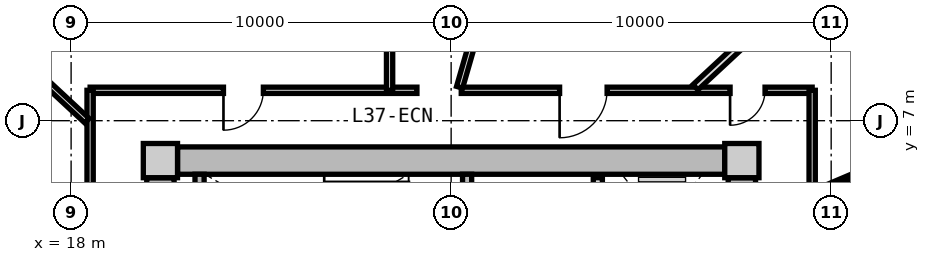
"""IFC4 building model, lengths in metres.
Left out: names, types, materials, properties, quantities, classifications, styles, units other than length and angle.
Written with IfcOpenShell. Run it as: python <this file> out.ifc"""

import sys

from ifc_helpers import new_model, si_unit, direction, frame, frame_2d, origin, origin_2d, place, context, subcontext, project, spatial, rectangle, extrude, source, transform, mapped, element, fill, save


model = new_model("IFC4")
c1 = context("Model", 3, precision=1e-05, world=origin(), true_north=direction((0.0, 1.0)))
c2 = subcontext(c1, "Body", "Model", "MODEL_VIEW")
j1 = project(units=[si_unit("LENGTHUNIT", "METRE"), si_unit("PLANEANGLEUNIT", "RADIAN")], contexts=[c1])
p1 = place(None, origin())
s1 = spatial("IfcSite", under=j1, at=p1, CompositionType="ELEMENT")
p2 = place(p1, origin())
s2 = spatial("IfcBuilding", under=s1, at=p2, CompositionType="ELEMENT")
p3 = place(p2, frame((0.0, 0.0, 120.65)))
s3 = spatial("IfcBuildingStorey", under=s2, at=p3, CompositionType="ELEMENT", Elevation=120.65)
m1 = source(origin(), c2, "Body", "SweptSolid", [
    extrude(rectangle(XDim=0.9, YDim=0.9, at=origin_2d()), origin(), (0.0, 0.0, 1.0), 3.05),
])
for number, where, z_axis, x_axis in (
    (1, (35.65, 5.95, 0.0), (0.0, 0.0, 1.0), (1.0, 0.0, 0.0)),
    (2, (20.35, 5.95, 0.0), (0.0, 0.0, 1.0), (1.0, 0.0, 0.0)),
):
    element("IfcColumn", number, at=place(p3, frame(where, z_axis=z_axis, x_axis=x_axis)), inside=s3, PredefinedType="COLUMN", context=c2, shape_type="MappedRepresentation", body=[
        mapped(m1, transform((0.0, 0.0, 0.0), x_axis=(1.0, 0.0, 0.0), y_axis=(0.0, 1.0, 0.0), z_axis=(0.0, 0.0, 1.0), scale=1.0)),
    ])
m2 = source(origin(), c2, "Body", "SweptSolid", [
    extrude(rectangle(XDim=14.4, YDim=0.72, at=frame_2d((7.2, 0.0))), origin(), (0.0, 0.0, 1.0), 2.79),
])
p4 = place(p3, frame((20.8, 5.95, 0.0), z_axis=(0.0, 0.0, 1.0), x_axis=(1.0, 0.0, 0.0)))
e3 = element("IfcWall", 3, at=p4, inside=s3, PredefinedType="SHEAR", context=c2, shape_type="MappedRepresentation", body=[
    mapped(m2, transform((0.0, 0.0, 0.0), x_axis=(1.0, 0.0, 0.0), y_axis=(0.0, 1.0, 0.0), z_axis=(0.0, 0.0, 1.0), scale=1.0)),
])
m3 = source(origin(), c2, "Body", "SweptSolid", [
    extrude(rectangle(XDim=11.0, YDim=0.72, at=frame_2d((5.5, 0.0))), origin(), (0.0, 0.0, 1.0), 2.79),
])
p5 = place(p3, frame((20.35, -5.5, 0.0), z_axis=(0.0, 0.0, 1.0), x_axis=(0.0, 1.0, 0.0)))
e4 = element("IfcWall", 4, at=p5, inside=s3, PredefinedType="SHEAR", context=c2, shape_type="MappedRepresentation", body=[
    mapped(m3, transform((0.0, 0.0, 0.0), x_axis=(1.0, 0.0, 0.0), y_axis=(0.0, 1.0, 0.0), z_axis=(0.0, 0.0, 1.0), scale=1.0)),
])
p6 = place(p5, frame((3.8, 0.0, 0.0)))
e5 = element("IfcOpeningElement", 5, at=p6, cuts=e4, PredefinedType="OPENING", context=c2, shape_type="SweptSolid", body=[
    extrude(rectangle(XDim=1.2, YDim=2.15, at=frame_2d((0.6, 1.075))), frame((0.0, 0.37, 0.0), z_axis=(0.0, -1.0, 0.0), x_axis=(1.0, 0.0, 0.0)), (0.0, 0.0, 1.0), 0.74),
])
p7 = place(p3, frame((35.65, 5.5, 0.0), z_axis=(0.0, 0.0, 1.0), x_axis=(0.0, -1.0, 0.0)))
e6 = element("IfcWall", 6, at=p7, inside=s3, PredefinedType="SHEAR", context=c2, shape_type="MappedRepresentation", body=[
    mapped(m3, transform((0.0, 0.0, 0.0), x_axis=(1.0, 0.0, 0.0), y_axis=(0.0, 1.0, 0.0), z_axis=(0.0, 0.0, 1.0), scale=1.0)),
])
p8 = place(p7, frame((5.65, 0.0, 0.0)))
e7 = element("IfcOpeningElement", 7, at=p8, cuts=e6, PredefinedType="OPENING", context=c2, shape_type="SweptSolid", body=[
    extrude(rectangle(XDim=1.2, YDim=2.15, at=frame_2d((0.6, 1.075))), frame((0.0, 0.37, 0.0), z_axis=(0.0, -1.0, 0.0), x_axis=(1.0, 0.0, 0.0)), (0.0, 0.0, 1.0), 0.74),
])
m4 = source(origin(), c2, "Body", "SweptSolid", [
    extrude(rectangle(XDim=3.14, YDim=0.24, at=frame_2d((1.57, 0.0))), origin(), (0.0, 0.0, 1.0), 2.79),
])
p9 = place(p3, frame((21.38, 2.45, 0.0), z_axis=(0.0, 0.0, 1.0), x_axis=(0.0, 1.0, 0.0)))
e8 = element("IfcWall", 8, at=p9, inside=s3, PredefinedType="PARTITIONING", context=c2, shape_type="MappedRepresentation", body=[
    mapped(m4, transform((0.0, 0.0, 0.0), x_axis=(1.0, 0.0, 0.0), y_axis=(0.0, 1.0, 0.0), z_axis=(0.0, 0.0, 1.0), scale=1.0)),
])
p10 = place(p3, frame((28.42, 2.45, 0.0), z_axis=(0.0, 0.0, 1.0), x_axis=(0.0, 1.0, 0.0)))
e9 = element("IfcWall", 9, at=p10, inside=s3, PredefinedType="PARTITIONING", context=c2, shape_type="MappedRepresentation", body=[
    mapped(m4, transform((0.0, 0.0, 0.0), x_axis=(1.0, 0.0, 0.0), y_axis=(0.0, 1.0, 0.0), z_axis=(0.0, 0.0, 1.0), scale=1.0)),
])
p11 = place(p10, frame((0.55, 0.0, 0.0)))
e10 = element("IfcOpeningElement", 10, at=p11, cuts=e9, PredefinedType="OPENING", context=c2, shape_type="SweptSolid", body=[
    extrude(rectangle(XDim=1.1, YDim=2.15, at=frame_2d((0.55, 1.075))), frame((0.0, 0.13, 0.0), z_axis=(0.0, -1.0, 0.0), x_axis=(1.0, 0.0, 0.0)), (0.0, 0.0, 1.0), 0.26),
])
m5 = source(origin(), c2, "Body", "SweptSolid", [
    extrude(rectangle(XDim=5.0, YDim=0.24, at=frame_2d((2.5, 0.0))), origin(), (0.0, 0.0, 1.0), 2.775),
])
p12 = place(p3, frame((31.86, 0.5, 0.0), z_axis=(0.0, 0.0, 1.0), x_axis=(0.0, 1.0, 0.0)))
e11 = element("IfcWall", 11, at=p12, inside=s3, PredefinedType="PARTITIONING", context=c2, shape_type="MappedRepresentation", body=[
    mapped(m5, transform((0.0, 0.0, 0.0), x_axis=(1.0, 0.0, 0.0), y_axis=(0.0, 1.0, 0.0), z_axis=(0.0, 0.0, 1.0), scale=1.0)),
])
p13 = place(p12, frame((3.05, 0.0, 0.0)))
e12 = element("IfcOpeningElement", 12, at=p13, cuts=e11, PredefinedType="OPENING", context=c2, shape_type="SweptSolid", body=[
    extrude(rectangle(XDim=1.3, YDim=2.2, at=frame_2d((0.65, 1.1))), frame((0.0, 0.13, 0.0), z_axis=(0.0, -1.0, 0.0), x_axis=(1.0, 0.0, 0.0)), (0.0, 0.0, 1.0), 0.26),
])
p14 = place(p12, frame((0.55, 0.0, 0.0)))
e13 = element("IfcOpeningElement", 13, at=p14, cuts=e11, PredefinedType="OPENING", context=c2, shape_type="SweptSolid", body=[
    extrude(rectangle(XDim=1.3, YDim=2.2, at=frame_2d((0.65, 1.1))), frame((0.0, 0.13, 0.0), z_axis=(0.0, -1.0, 0.0), x_axis=(1.0, 0.0, 0.0)), (0.0, 0.0, 1.0), 0.26),
])
m6 = source(origin(), c2, "Body", "SweptSolid", [
    extrude(rectangle(XDim=8.6, YDim=0.165, at=frame_2d((4.3, 0.0))), origin(), (0.0, 0.0, 1.0), 2.775),
])
p15 = place(p3, frame((18.5, 7.8, 0.0), z_axis=(0.0, 0.0, 1.0), x_axis=(1.0, 0.0, 0.0)))
e14 = element("IfcWall", 14, at=p15, inside=s3, PredefinedType="PARTITIONING", context=c2, shape_type="MappedRepresentation", body=[
    mapped(m6, transform((0.0, 0.0, 0.0), x_axis=(1.0, 0.0, 0.0), y_axis=(0.0, 1.0, 0.0), z_axis=(0.0, 0.0, 1.0), scale=1.0)),
])
p16 = place(p15, frame((3.509, 0.0, 0.0)))
e15 = element("IfcOpeningElement", 15, at=p16, cuts=e14, PredefinedType="OPENING", context=c2, shape_type="SweptSolid", body=[
    extrude(rectangle(XDim=1.05, YDim=2.15, at=frame_2d((0.525, 1.075))), frame((0.0, 0.093, 0.0), z_axis=(0.0, -1.0, 0.0), x_axis=(1.0, 0.0, 0.0)), (0.0, 0.0, 1.0), 0.185),
])
m7 = source(origin(), c2, "Body", "SweptSolid", [
    extrude(rectangle(XDim=9.234, YDim=0.165, at=frame_2d((4.617, 0.0))), origin(), (0.0, 0.0, 1.0), 2.775),
])
p17 = place(p3, frame((28.266, 7.8, 0.0), z_axis=(0.0, 0.0, 1.0), x_axis=(1.0, 0.0, 0.0)))
e16 = element("IfcWall", 16, at=p17, inside=s3, PredefinedType="PARTITIONING", context=c2, shape_type="MappedRepresentation", body=[
    mapped(m7, transform((0.0, 0.0, 0.0), x_axis=(1.0, 0.0, 0.0), y_axis=(0.0, 1.0, 0.0), z_axis=(0.0, 0.0, 1.0), scale=1.0)),
])
p18 = place(p17, frame((7.074, 0.0, 0.0)))
e17 = element("IfcOpeningElement", 17, at=p18, cuts=e16, PredefinedType="OPENING", context=c2, shape_type="SweptSolid", body=[
    extrude(rectangle(XDim=0.92, YDim=2.1, at=frame_2d((0.46, 1.05))), frame((0.0, 0.093, 0.0), z_axis=(0.0, -1.0, 0.0), x_axis=(1.0, 0.0, 0.0)), (0.0, 0.0, 1.0), 0.185),
])
p19 = place(p17, frame((2.588, 0.0, 0.0)))
e18 = element("IfcOpeningElement", 18, at=p19, cuts=e16, PredefinedType="OPENING", context=c2, shape_type="SweptSolid", body=[
    extrude(rectangle(XDim=1.25, YDim=2.2, at=frame_2d((0.625, 1.1))), frame((0.0, 0.093, 0.0), z_axis=(0.0, -1.0, 0.0), x_axis=(1.0, 0.0, 0.0)), (0.0, 0.0, 1.0), 0.185),
])
m8 = source(origin(), c2, "Body", "SweptSolid", [
    extrude(rectangle(XDim=15.6, YDim=0.165, at=frame_2d((7.8, 0.0))), origin(), (0.0, 0.0, 1.0), 2.775),
])
p20 = place(p3, frame((18.5, -7.8, 0.0), z_axis=(0.0, 0.0, 1.0), x_axis=(0.0, 1.0, 0.0)))
e19 = element("IfcWall", 19, at=p20, inside=s3, PredefinedType="PARTITIONING", context=c2, shape_type="MappedRepresentation", body=[
    mapped(m8, transform((0.0, 0.0, 0.0), x_axis=(1.0, 0.0, 0.0), y_axis=(0.0, 1.0, 0.0), z_axis=(0.0, 0.0, 1.0), scale=1.0)),
])
p21 = place(p20, frame((10.383, 0.0, 0.0)))
e20 = element("IfcOpeningElement", 20, at=p21, cuts=e19, PredefinedType="OPENING", context=c2, shape_type="SweptSolid", body=[
    extrude(rectangle(XDim=1.05, YDim=2.15, at=frame_2d((0.525, 1.075))), frame((0.0, 0.093, 0.0), z_axis=(0.0, -1.0, 0.0), x_axis=(1.0, 0.0, 0.0)), (0.0, 0.0, 1.0), 0.185),
])
p22 = place(p20, frame((6.419, 0.0, 0.0)))
e21 = element("IfcOpeningElement", 21, at=p22, cuts=e19, PredefinedType="OPENING", context=c2, shape_type="SweptSolid", body=[
    extrude(rectangle(XDim=1.05, YDim=2.15, at=frame_2d((0.525, 1.075))), frame((0.0, 0.093, 0.0), z_axis=(0.0, -1.0, 0.0), x_axis=(1.0, 0.0, 0.0)), (0.0, 0.0, 1.0), 0.185),
])
p23 = place(p3, frame((37.5, 7.8, 0.0), z_axis=(0.0, 0.0, 1.0), x_axis=(0.0, -1.0, 0.0)))
e22 = element("IfcWall", 22, at=p23, inside=s3, PredefinedType="PARTITIONING", context=c2, shape_type="MappedRepresentation", body=[
    mapped(m8, transform((0.0, 0.0, 0.0), x_axis=(1.0, 0.0, 0.0), y_axis=(0.0, 1.0, 0.0), z_axis=(0.0, 0.0, 1.0), scale=1.0)),
])
p24 = place(p23, frame((12.094, 0.0, 0.0)))
e23 = element("IfcOpeningElement", 23, at=p24, cuts=e22, PredefinedType="OPENING", context=c2, shape_type="SweptSolid", body=[
    extrude(rectangle(XDim=1.05, YDim=2.15, at=frame_2d((0.525, 1.075))), frame((0.0, 0.093, 0.0), z_axis=(0.0, -1.0, 0.0), x_axis=(1.0, 0.0, 0.0)), (0.0, 0.0, 1.0), 0.185),
])
p25 = place(p23, frame((5.971, 0.0, 0.0)))
e24 = element("IfcOpeningElement", 24, at=p25, cuts=e22, PredefinedType="OPENING", context=c2, shape_type="SweptSolid", body=[
    extrude(rectangle(XDim=1.05, YDim=2.15, at=frame_2d((0.525, 1.075))), frame((0.0, 0.093, 0.0), z_axis=(0.0, -1.0, 0.0), x_axis=(1.0, 0.0, 0.0)), (0.0, 0.0, 1.0), 0.185),
])
p26 = place(p23, frame((3.324, 0.0, 0.0)))
e25 = element("IfcOpeningElement", 25, at=p26, cuts=e22, PredefinedType="OPENING", context=c2, shape_type="SweptSolid", body=[
    extrude(rectangle(XDim=0.92, YDim=2.1, at=frame_2d((0.46, 1.05))), frame((0.0, 0.093, 0.0), z_axis=(0.0, -1.0, 0.0), x_axis=(1.0, 0.0, 0.0)), (0.0, 0.0, 1.0), 0.185),
])
m9 = source(origin(), c2, "Body", "SweptSolid", [
    extrude(rectangle(XDim=8.989, YDim=0.165, at=frame_2d((4.495, 0.0))), origin(), (0.0, 0.0, 1.0), 2.275),
])
p27 = place(p3, frame((28.222, 7.88, 0.0), z_axis=(0.0, 0.0, 1.0), x_axis=(0.27702323008, 0.960863221274, 0.0)))
e26 = element("IfcWall", 26, at=p27, inside=s3, PredefinedType="PARTITIONING", context=c2, shape_type="MappedRepresentation", body=[
    mapped(m9, transform((0.0, 0.0, 0.0), x_axis=(1.0, 0.0, 0.0), y_axis=(0.0, 1.0, 0.0), z_axis=(0.0, 0.0, 1.0), scale=1.0)),
])
m10 = source(origin(), c2, "Body", "SweptSolid", [
    extrude(rectangle(XDim=7.482, YDim=0.165, at=frame_2d((3.741, 0.0))), origin(), (0.0, 0.0, 1.0), 2.275),
])
p28 = place(p3, frame((18.42, 6.998, 0.0), z_axis=(0.0, 0.0, 1.0), x_axis=(-0.732508698043, 0.680757671489, 0.0)))
e27 = element("IfcWall", 27, at=p28, inside=s3, PredefinedType="PARTITIONING", context=c2, shape_type="MappedRepresentation", body=[
    mapped(m10, transform((0.0, 0.0, 0.0), x_axis=(1.0, 0.0, 0.0), y_axis=(0.0, 1.0, 0.0), z_axis=(0.0, 0.0, 1.0), scale=1.0)),
])
m11 = source(origin(), c2, "Body", "SweptSolid", [
    extrude(rectangle(XDim=6.99, YDim=0.165, at=frame_2d((3.495, 0.0))), origin(), (0.0, 0.0, 1.0), 2.775),
])
p29 = place(p3, frame((26.38, 7.8, 0.0), z_axis=(0.0, 0.0, 1.0), x_axis=(0.0, 1.0, 0.0)))
e28 = element("IfcWall", 28, at=p29, inside=s3, PredefinedType="PARTITIONING", context=c2, shape_type="MappedRepresentation", body=[
    mapped(m11, transform((0.0, 0.0, 0.0), x_axis=(1.0, 0.0, 0.0), y_axis=(0.0, 1.0, 0.0), z_axis=(0.0, 0.0, 1.0), scale=1.0)),
])
m12 = source(origin(), c2, "Body", "SweptSolid", [
    extrude(rectangle(XDim=4.735, YDim=0.14, at=frame_2d((2.368, 0.0))), origin(), (0.0, 0.0, 1.0), 2.775),
])
p30 = place(p3, frame((18.47, 4.368, 0.0), z_axis=(0.0, 0.0, 1.0), x_axis=(-0.863537576642, 0.504284496814, 0.0)))
e29 = element("IfcWall", 29, at=p30, inside=s3, PredefinedType="PARTITIONING", context=c2, shape_type="MappedRepresentation", body=[
    mapped(m12, transform((0.0, 0.0, 0.0), x_axis=(1.0, 0.0, 0.0), y_axis=(0.0, 1.0, 0.0), z_axis=(0.0, 0.0, 1.0), scale=1.0)),
])
p31 = place(p30, frame((1.908, 0.0, 0.0)))
e30 = element("IfcOpeningElement", 30, at=p31, cuts=e29, PredefinedType="OPENING", context=c2, shape_type="SweptSolid", body=[
    extrude(rectangle(XDim=0.92, YDim=2.1, at=frame_2d((0.46, 1.05))), frame((0.0, 0.08, 0.0), z_axis=(0.0, -1.0, 0.0), x_axis=(1.0, 0.0, 0.0)), (0.0, 0.0, 1.0), 0.16),
])
m13 = source(origin(), c2, "Body", "SweptSolid", [
    extrude(rectangle(XDim=6.187, YDim=0.19, at=frame_2d((3.093, 0.0))), origin(), (0.0, 0.0, 1.0), 2.275),
])
p32 = place(p3, frame((34.429, 7.88, 0.0), z_axis=(0.0, 0.0, 1.0), x_axis=(0.732501077882, 0.680765870841, 0.0)))
e31 = element("IfcWall", 31, at=p32, inside=s3, PredefinedType="PARTITIONING", context=c2, shape_type="MappedRepresentation", body=[
    mapped(m13, transform((0.0, 0.0, 0.0), x_axis=(1.0, 0.0, 0.0), y_axis=(0.0, 1.0, 0.0), z_axis=(0.0, 0.0, 1.0), scale=1.0)),
])
m14 = source(origin(), c2, "Body", "SweptSolid", [
    extrude(rectangle(XDim=4.968, YDim=0.14, at=frame_2d((2.484, 0.0))), origin(), (0.0, 0.0, 1.0), 2.775),
])
p33 = place(p3, frame((37.53, 5.092, 0.0), z_axis=(0.0, 0.0, 1.0), x_axis=(0.920595165864, 0.39051829738, 0.0)))
e32 = element("IfcWall", 32, at=p33, inside=s3, PredefinedType="PARTITIONING", context=c2, shape_type="MappedRepresentation", body=[
    mapped(m14, transform((0.0, 0.0, 0.0), x_axis=(1.0, 0.0, 0.0), y_axis=(0.0, 1.0, 0.0), z_axis=(0.0, 0.0, 1.0), scale=1.0)),
])
m15 = source(origin(), c2, "Body", "SweptSolid", [
    extrude(rectangle(XDim=1.05, YDim=2.15, at=frame_2d((0.525, 1.075))), frame((0.0, 0.025, 0.0), z_axis=(0.0, -1.0, 0.0), x_axis=(1.0, 0.0, 0.0)), (0.0, 0.0, 1.0), 0.05),
])
p34 = place(p16, frame((1.05, 0.0, 0.0), z_axis=(0.0, 0.0, 1.0), x_axis=(-1.0, 0.0, 0.0)))
e33 = element("IfcDoor", 33, at=p34, inside=s3, OperationType="SINGLE_SWING_RIGHT", PredefinedType="DOOR", context=c2, shape_type="MappedRepresentation", body=[
    mapped(m15, transform((0.0, 0.0, 0.0), x_axis=(1.0, 0.0, 0.0), y_axis=(0.0, 1.0, 0.0), z_axis=(0.0, 0.0, 1.0), scale=1.0)),
])
fill(e15, e33)
m16 = source(origin(), c2, "Body", "SweptSolid", [
    extrude(rectangle(XDim=0.92, YDim=2.1, at=frame_2d((0.46, 1.05))), frame((0.0, 0.025, 0.0), z_axis=(0.0, -1.0, 0.0), x_axis=(1.0, 0.0, 0.0)), (0.0, 0.0, 1.0), 0.05),
])
p35 = place(p18, frame((0.92, 0.0, 0.0), z_axis=(0.0, 0.0, 1.0), x_axis=(-1.0, 0.0, 0.0)))
e34 = element("IfcDoor", 34, at=p35, inside=s3, OperationType="SINGLE_SWING_RIGHT", PredefinedType="DOOR", context=c2, shape_type="MappedRepresentation", body=[
    mapped(m16, transform((0.0, 0.0, 0.0), x_axis=(1.0, 0.0, 0.0), y_axis=(0.0, 1.0, 0.0), z_axis=(0.0, 0.0, 1.0), scale=1.0)),
])
fill(e17, e34)
m17 = source(origin(), c2, "Body", "SweptSolid", [
    extrude(rectangle(XDim=1.25, YDim=2.2, at=frame_2d((0.625, 1.1))), frame((0.0, 0.025, 0.0), z_axis=(0.0, -1.0, 0.0), x_axis=(1.0, 0.0, 0.0)), (0.0, 0.0, 1.0), 0.05),
])
p36 = place(p19, frame((1.25, 0.0, 0.0), z_axis=(0.0, 0.0, 1.0), x_axis=(-1.0, 0.0, 0.0)))
e35 = element("IfcDoor", 35, at=p36, inside=s3, OperationType="SINGLE_SWING_RIGHT", PredefinedType="DOOR", context=c2, shape_type="MappedRepresentation", body=[
    mapped(m17, transform((0.0, 0.0, 0.0), x_axis=(1.0, 0.0, 0.0), y_axis=(0.0, 1.0, 0.0), z_axis=(0.0, 0.0, 1.0), scale=1.0)),
])
fill(e18, e35)
save(model, sys.argv[1])
